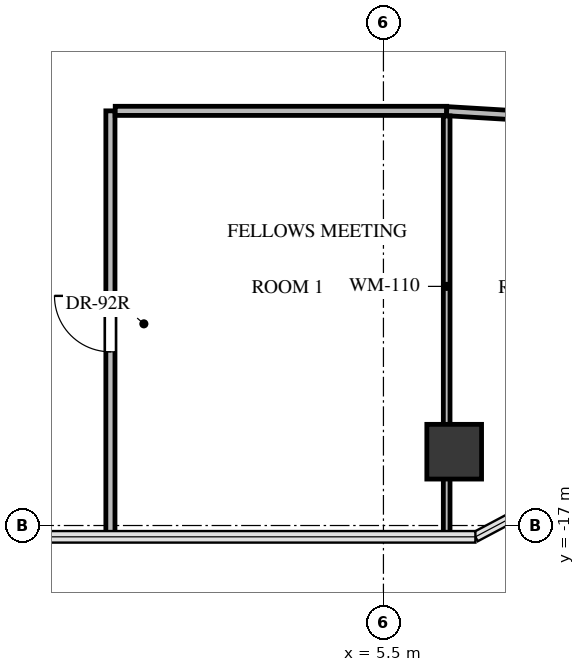
"""IFC4 building model, lengths in metres.
Left out: names, types, materials, properties, quantities, classifications, styles, units other than length and angle.
Written with IfcOpenShell. Run it as: python <this file> out.ifc"""

import sys

from ifc_helpers import new_model, si_unit, direction, frame, frame_2d, origin, origin_2d, place, context, subcontext, project, spatial, rectangle, extrude, source, transform, mapped, element, fill, save


model = new_model("IFC4")
c1 = context("Model", 3, precision=1e-05, world=origin(), true_north=direction((0.0, 1.0)))
c2 = subcontext(c1, "Body", "Model", "MODEL_VIEW")
j1 = project(units=[si_unit("LENGTHUNIT", "METRE"), si_unit("PLANEANGLEUNIT", "RADIAN")], contexts=[c1])
p1 = place(None, origin())
s1 = spatial("IfcSite", under=j1, at=p1, CompositionType="ELEMENT")
p2 = place(p1, origin())
s2 = spatial("IfcBuilding", under=s1, at=p2, CompositionType="ELEMENT")
p3 = place(p2, frame((0.0, 0.0, 251.3)))
s3 = spatial("IfcBuildingStorey", under=s2, at=p3, CompositionType="ELEMENT", Elevation=251.3)
m1 = source(origin(), c2, "Body", "SweptSolid", [
    extrude(rectangle(XDim=0.9, YDim=0.9, at=origin_2d()), origin(), (0.0, 0.0, 1.0), 3.4),
])
p4 = place(p3, frame((6.664, -15.786, -0.24), z_axis=(0.0, 0.0, 1.0), x_axis=(1.0, 0.0, 0.0)))
e1 = element("IfcColumn", 1, at=p4, inside=s3, PredefinedType="COLUMN", context=c2, shape_type="MappedRepresentation", body=[
    mapped(m1, transform((0.0, 0.0, 0.0), x_axis=(1.0, 0.0, 0.0), y_axis=(0.0, 1.0, 0.0), z_axis=(0.0, 0.0, 1.0), scale=1.0)),
])
p5 = place(p3, frame((1.01, -17.186, 0.0), z_axis=(0.0, 0.0, 1.0), x_axis=(0.0, 1.0, 0.0)))
e2 = element("IfcWall", 2, at=p5, inside=s3, PredefinedType="PARTITIONING", context=c2, shape_type="SweptSolid", body=[
    extrude(rectangle(XDim=7.006, YDim=0.15, at=frame_2d((3.503, 0.0))), origin(), (0.0, 0.0, 1.0), 2.499),
])
p6 = place(p5, frame((3.043, 0.0, 0.0)))
e3 = element("IfcOpeningElement", 3, at=p6, cuts=e2, PredefinedType="OPENING", context=c2, shape_type="SweptSolid", body=[
    extrude(rectangle(XDim=0.92, YDim=2.1, at=frame_2d((0.46, 1.05))), frame((0.0, 0.085, 0.0), z_axis=(0.0, -1.0, 0.0), x_axis=(1.0, 0.0, 0.0)), (0.0, 0.0, 1.0), 0.17),
])
p7 = place(p3, frame((1.089, -10.18, 0.0), z_axis=(0.0, 0.0, 1.0), x_axis=(1.0, 0.0, 0.0)))
e4 = element("IfcWall", 4, at=p7, inside=s3, PredefinedType="PARTITIONING", context=c2, shape_type="SweptSolid", body=[
    extrude(rectangle(XDim=5.451, YDim=0.15, at=frame_2d((2.726, 0.0))), origin(), (0.0, 0.0, 1.0), 2.401),
])
p8 = place(p3, frame((6.54, -10.185, 0.0), z_axis=(0.0, 0.0, 1.0), x_axis=(0.9981941592, -0.060070130174, 0.0)))
e5 = element("IfcWall", 5, at=p8, inside=s3, PredefinedType="PARTITIONING", context=c2, shape_type="SweptSolid", body=[
    extrude(rectangle(XDim=6.21, YDim=0.15, at=frame_2d((3.105, 0.0))), origin(), (0.0, 0.0, 1.0), 2.499),
])
p9 = place(p8, frame((2.63, 0.0, 0.0)))
e6 = element("IfcOpeningElement", 6, at=p9, cuts=e5, PredefinedType="OPENING", context=c2, shape_type="SweptSolid", body=[
    extrude(rectangle(XDim=0.95, YDim=2.1, at=frame_2d((0.475, 1.05))), frame((0.0, 0.085, 0.0), z_axis=(0.0, -1.0, 0.0), x_axis=(1.0, 0.0, 0.0)), (0.0, 0.0, 1.0), 0.17),
])
p10 = place(p3, frame((6.54, -10.264, 0.0), z_axis=(0.0, 0.0, 1.0), x_axis=(0.0, -1.0, 0.0)))
e7 = element("IfcWall", 7, at=p10, inside=s3, PredefinedType="MOVABLE", context=c2, shape_type="SweptSolid", body=[
    extrude(rectangle(XDim=5.606, YDim=0.11, at=frame_2d((2.803, 0.0))), origin(), (0.0, 0.0, 1.0), 2.401),
])
p11 = place(p3, frame((6.54, -15.87, 0.0), z_axis=(0.0, 0.0, 1.0), x_axis=(0.0, -1.0, 0.0)))
e8 = element("IfcWall", 8, at=p11, inside=s3, PredefinedType="MOVABLE", context=c2, shape_type="SweptSolid", body=[
    extrude(rectangle(XDim=1.316, YDim=0.11, at=frame_2d((0.658, 0.0))), origin(), (0.0, 0.0, 1.0), 1.977),
])
m2 = source(origin(), c2, "Body", "SweptSolid", [
    extrude(rectangle(XDim=0.92, YDim=2.1, at=frame_2d((0.46, 1.05))), frame((0.0, 0.025, 0.0), z_axis=(0.0, -1.0, 0.0), x_axis=(1.0, 0.0, 0.0)), (0.0, 0.0, 1.0), 0.05),
])
p12 = place(p6, origin())
e9 = element("IfcDoor", 9, at=p12, inside=s3, OperationType="SINGLE_SWING_RIGHT", PredefinedType="DOOR", context=c2, shape_type="MappedRepresentation", body=[
    mapped(m2, transform((0.0, 0.0, 0.0), x_axis=(1.0, 0.0, 0.0), y_axis=(0.0, 1.0, 0.0), z_axis=(0.0, 0.0, 1.0), scale=1.0)),
])
fill(e3, e9)
save(model, sys.argv[1])
